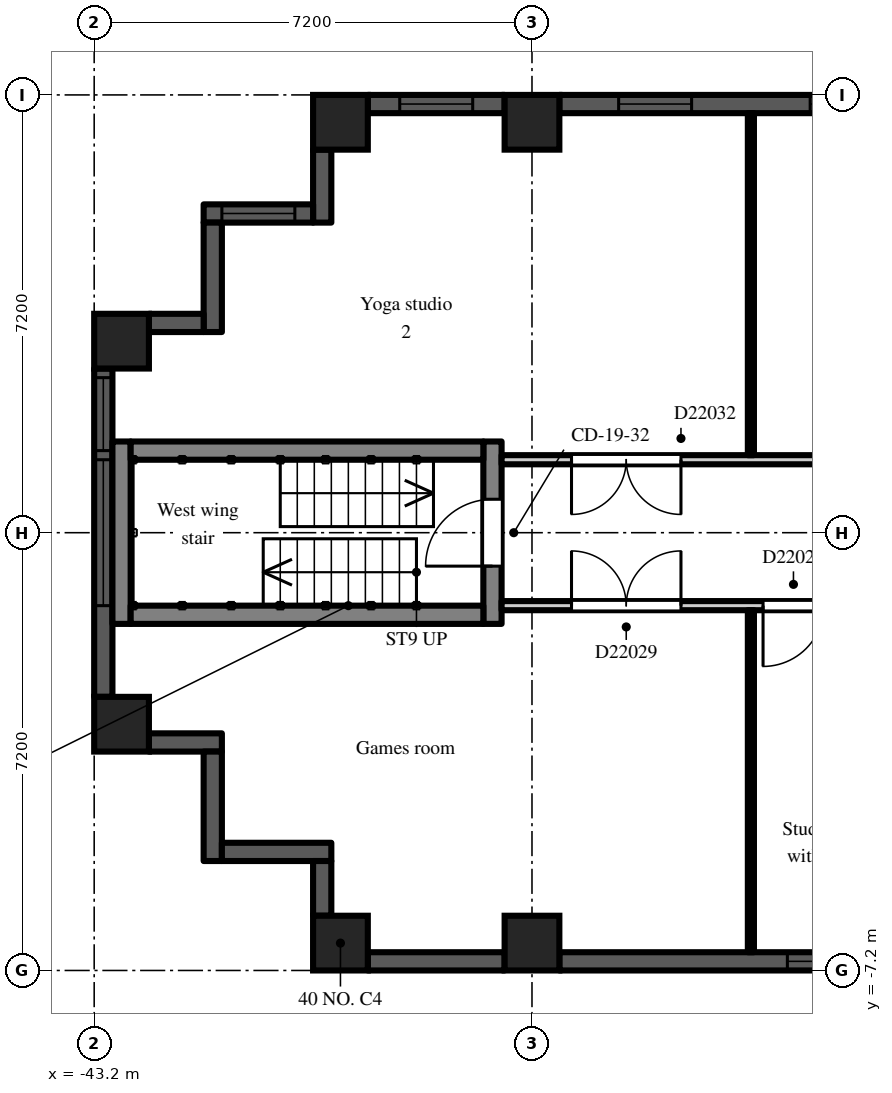
"""IFC4 building model, lengths in metres.
Left out: names, types, materials, properties, quantities, classifications, styles, units other than length and angle.
Written with IfcOpenShell. Run it as: python <this file> out.ifc"""

import sys

from ifc_helpers import new_model, si_unit, direction, frame, frame_2d, origin, origin_2d, place, context, subcontext, project, spatial, rectangle, extrude, element, fill, save


model = new_model("IFC4")
c1 = context("Model", 3, precision=1e-05, world=origin(), true_north=direction((0.0, 1.0)))
c2 = subcontext(c1, "Body", "Model", "MODEL_VIEW")
j1 = project(units=[si_unit("LENGTHUNIT", "METRE"), si_unit("PLANEANGLEUNIT", "RADIAN")], contexts=[c1])
p1 = place(None, origin())
s1 = spatial("IfcSite", under=j1, at=p1, CompositionType="ELEMENT")
p2 = place(p1, origin())
s2 = spatial("IfcBuilding", under=s1, at=p2, CompositionType="ELEMENT")
p3 = place(p2, frame((0.0, 0.0, 159.3)))
s3 = spatial("IfcBuildingStorey", under=s2, at=p3, CompositionType="ELEMENT", Elevation=159.3)
for number, where, z_axis, x_axis in (
    (1, (-42.75, -3.15, 0.0), (0.0, 0.0, 1.0), (1.0, 0.0, 0.0)),
    (2, (-42.75, 3.15, 0.0), (0.0, 0.0, 1.0), (1.0, 0.0, 0.0)),
    (3, (-39.15, -6.75, 0.0), (0.0, 0.0, 1.0), (1.0, 0.0, 0.0)),
    (4, (-39.15, 6.75, 0.0), (0.0, 0.0, 1.0), (1.0, 0.0, 0.0)),
    (5, (-36.0, -6.75, 0.0), (0.0, 0.0, 1.0), (1.0, 0.0, 0.0)),
    (6, (-36.0, 6.75, 0.0), (0.0, 0.0, 1.0), (1.0, 0.0, 0.0)),
):
    element("IfcColumn", number, at=place(p3, frame(where, z_axis=z_axis, x_axis=x_axis)), inside=s3, PredefinedType="COLUMN", context=c2, shape_type="SweptSolid", body=[
        extrude(rectangle(XDim=0.9, YDim=0.9, at=origin_2d()), origin(), (0.0, 0.0, 1.0), 3.0),
    ])
p4 = place(p3, frame((-29.25, 7.05, 0.0), z_axis=(0.0, 0.0, 1.0), x_axis=(-1.0, 0.0, 0.0)))
e7 = element("IfcWall", 7, at=p4, inside=s3, PredefinedType="SOLIDWALL", context=c2, shape_type="SweptSolid", body=[
    extrude(rectangle(XDim=6.3, YDim=0.3, at=frame_2d((3.15, 0.0))), origin(), (0.0, 0.0, 1.0), 2.2),
])
p5 = place(p4, frame((0.975, 0.0, 0.2)))
e8 = element("IfcOpeningElement", 8, at=p5, cuts=e7, PredefinedType="OPENING", context=c2, shape_type="SweptSolid", body=[
    extrude(rectangle(XDim=1.2, YDim=1.85, at=frame_2d((0.6, 0.925))), frame((0.0, 0.16, 0.0), z_axis=(0.0, -1.0, 0.0), x_axis=(1.0, 0.0, 0.0)), (0.0, 0.0, 1.0), 0.32),
])
p6 = place(p4, frame((4.125, 0.0, 0.2)))
e9 = element("IfcOpeningElement", 9, at=p6, cuts=e7, PredefinedType="OPENING", context=c2, shape_type="SweptSolid", body=[
    extrude(rectangle(XDim=1.2, YDim=1.85, at=frame_2d((0.6, 0.925))), frame((0.0, 0.16, 0.0), z_axis=(0.0, -1.0, 0.0), x_axis=(1.0, 0.0, 0.0)), (0.0, 0.0, 1.0), 0.32),
])
p7 = place(p3, frame((-36.45, 7.05, 0.0), z_axis=(0.0, 0.0, 1.0), x_axis=(-1.0, 0.0, 0.0)))
e10 = element("IfcWall", 10, at=p7, inside=s3, PredefinedType="SOLIDWALL", context=c2, shape_type="SweptSolid", body=[
    extrude(rectangle(XDim=2.25, YDim=0.3, at=frame_2d((1.125, 0.0))), origin(), (0.0, 0.0, 1.0), 2.2),
])
p8 = place(p7, frame((0.525, 0.0, 0.2)))
e11 = element("IfcOpeningElement", 11, at=p8, cuts=e10, PredefinedType="OPENING", context=c2, shape_type="SweptSolid", body=[
    extrude(rectangle(XDim=1.2, YDim=1.85, at=frame_2d((0.6, 0.925))), frame((0.0, 0.16, 0.0), z_axis=(0.0, -1.0, 0.0), x_axis=(1.0, 0.0, 0.0)), (0.0, 0.0, 1.0), 0.32),
])
p9 = place(p3, frame((-39.45, 6.3, 0.0), z_axis=(0.0, 0.0, 1.0), x_axis=(0.0, -1.0, 0.0)))
e12 = element("IfcWall", 12, at=p9, inside=s3, PredefinedType="SOLIDWALL", context=c2, shape_type="SweptSolid", body=[
    extrude(rectangle(XDim=1.2, YDim=0.3, at=frame_2d((0.6, 0.0))), origin(), (0.0, 0.0, 1.0), 2.55),
])
p10 = place(p3, frame((-39.6, 5.25, 0.0), z_axis=(0.0, 0.0, 1.0), x_axis=(-1.0, 0.0, 0.0)))
e13 = element("IfcWall", 13, at=p10, inside=s3, PredefinedType="SOLIDWALL", context=c2, shape_type="SweptSolid", body=[
    extrude(rectangle(XDim=1.8, YDim=0.3, at=frame_2d((0.9, 0.0))), origin(), (0.0, 0.0, 1.0), 2.55),
])
p11 = place(p10, frame((0.3, 0.0, 0.2)))
e14 = element("IfcOpeningElement", 14, at=p11, cuts=e13, PredefinedType="OPENING", context=c2, shape_type="SweptSolid", body=[
    extrude(rectangle(XDim=1.2, YDim=1.85, at=frame_2d((0.6, 0.925))), frame((0.0, 0.16, 0.0), z_axis=(0.0, -1.0, 0.0), x_axis=(1.0, 0.0, 0.0)), (0.0, 0.0, 1.0), 0.32),
])
p12 = place(p3, frame((-41.25, 5.1, 0.0), z_axis=(0.0, 0.0, 1.0), x_axis=(0.0, -1.0, 0.0)))
e15 = element("IfcWall", 15, at=p12, inside=s3, PredefinedType="SOLIDWALL", context=c2, shape_type="SweptSolid", body=[
    extrude(rectangle(XDim=1.8, YDim=0.3, at=frame_2d((0.9, 0.0))), origin(), (0.0, 0.0, 1.0), 2.55),
])
p13 = place(p3, frame((-41.4, 3.45, 0.0), z_axis=(0.0, 0.0, 1.0), x_axis=(-1.0, 0.0, 0.0)))
e16 = element("IfcWall", 16, at=p13, inside=s3, PredefinedType="SOLIDWALL", context=c2, shape_type="SweptSolid", body=[
    extrude(rectangle(XDim=0.9, YDim=0.3, at=frame_2d((0.45, 0.0))), origin(), (0.0, 0.0, 1.0), 2.55),
])
p14 = place(p3, frame((-43.05, 2.7, 0.0), z_axis=(0.0, 0.0, 1.0), x_axis=(0.0, -1.0, 0.0)))
e17 = element("IfcWall", 17, at=p14, inside=s3, PredefinedType="SOLIDWALL", context=c2, shape_type="SweptSolid", body=[
    extrude(rectangle(XDim=5.4, YDim=0.3, at=frame_2d((2.7, 0.0))), origin(), (0.0, 0.0, 1.0), 2.2),
])
p15 = place(p14, frame((1.5, 0.0, 0.2)))
e18 = element("IfcOpeningElement", 18, at=p15, cuts=e17, PredefinedType="OPENING", context=c2, shape_type="SweptSolid", body=[
    extrude(rectangle(XDim=2.4, YDim=1.85, at=frame_2d((1.2, 0.925))), frame((0.0, 0.16, 0.0), z_axis=(0.0, -1.0, 0.0), x_axis=(1.0, 0.0, 0.0)), (0.0, 0.0, 1.0), 0.32),
])
p16 = place(p14, frame((0.15, 0.0, 0.2)))
e19 = element("IfcOpeningElement", 19, at=p16, cuts=e17, PredefinedType="OPENING", context=c2, shape_type="SweptSolid", body=[
    extrude(rectangle(XDim=1.2, YDim=1.85, at=frame_2d((0.6, 0.925))), frame((0.0, 0.16, 0.0), z_axis=(0.0, -1.0, 0.0), x_axis=(1.0, 0.0, 0.0)), (0.0, 0.0, 1.0), 0.32),
])
p17 = place(p3, frame((-42.3, -3.45, 0.0), z_axis=(0.0, 0.0, 1.0), x_axis=(1.0, 0.0, 0.0)))
e20 = element("IfcWall", 20, at=p17, inside=s3, PredefinedType="SOLIDWALL", context=c2, shape_type="SweptSolid", body=[
    extrude(rectangle(XDim=1.2, YDim=0.3, at=frame_2d((0.6, 0.0))), origin(), (0.0, 0.0, 1.0), 2.55),
])
p18 = place(p3, frame((-41.25, -3.6, 0.0), z_axis=(0.0, 0.0, 1.0), x_axis=(0.0, -1.0, 0.0)))
e21 = element("IfcWall", 21, at=p18, inside=s3, PredefinedType="SOLIDWALL", context=c2, shape_type="SweptSolid", body=[
    extrude(rectangle(XDim=1.8, YDim=0.3, at=frame_2d((0.9, 0.0))), origin(), (0.0, 0.0, 1.0), 2.55),
])
p19 = place(p3, frame((-41.1, -5.25, 0.0), z_axis=(0.0, 0.0, 1.0), x_axis=(1.0, 0.0, 0.0)))
e22 = element("IfcWall", 22, at=p19, inside=s3, PredefinedType="SOLIDWALL", context=c2, shape_type="SweptSolid", body=[
    extrude(rectangle(XDim=1.8, YDim=0.3, at=frame_2d((0.9, 0.0))), origin(), (0.0, 0.0, 1.0), 2.55),
])
p20 = place(p3, frame((-39.45, -5.4, 0.0), z_axis=(0.0, 0.0, 1.0), x_axis=(0.0, -1.0, 0.0)))
e23 = element("IfcWall", 23, at=p20, inside=s3, PredefinedType="SOLIDWALL", context=c2, shape_type="SweptSolid", body=[
    extrude(rectangle(XDim=0.9, YDim=0.3, at=frame_2d((0.45, 0.0))), origin(), (0.0, 0.0, 1.0), 2.55),
])
p21 = place(p3, frame((-38.7, -7.05, 0.0), z_axis=(0.0, 0.0, 1.0), x_axis=(1.0, 0.0, 0.0)))
e24 = element("IfcWall", 24, at=p21, inside=s3, PredefinedType="SOLIDWALL", context=c2, shape_type="SweptSolid", body=[
    extrude(rectangle(XDim=2.25, YDim=0.3, at=frame_2d((1.125, 0.0))), origin(), (0.0, 0.0, 1.0), 2.2),
])
p22 = place(p3, frame((-35.55, -7.05, 0.0), z_axis=(0.0, 0.0, 1.0), x_axis=(1.0, 0.0, 0.0)))
e25 = element("IfcWall", 25, at=p22, inside=s3, PredefinedType="SOLIDWALL", context=c2, shape_type="SweptSolid", body=[
    extrude(rectangle(XDim=6.3, YDim=0.3, at=frame_2d((3.15, 0.0))), origin(), (0.0, 0.0, 1.0), 2.2),
])
p23 = place(p22, frame((3.75, 0.0, 0.2)))
e26 = element("IfcOpeningElement", 26, at=p23, cuts=e25, PredefinedType="OPENING", context=c2, shape_type="SweptSolid", body=[
    extrude(rectangle(XDim=2.4, YDim=1.85, at=frame_2d((1.2, 0.925))), frame((0.0, 0.16, 0.0), z_axis=(0.0, -1.0, 0.0), x_axis=(1.0, 0.0, 0.0)), (0.0, 0.0, 1.0), 0.32),
])
p24 = place(p3, frame((-36.65, -1.5, 0.0), z_axis=(0.0, 0.0, 1.0), x_axis=(0.0, 1.0, 0.0)))
e27 = element("IfcWall", 27, at=p24, inside=s3, PredefinedType="SHEAR", context=c2, shape_type="SweptSolid", body=[
    extrude(rectangle(XDim=3.0, YDim=0.3, at=frame_2d((1.5, 0.0))), origin(), (0.0, 0.0, 1.0), 2.55),
])
p25 = place(p24, frame((0.95, 0.0, 0.0)))
e28 = element("IfcOpeningElement", 28, at=p25, cuts=e27, PredefinedType="OPENING", context=c2, shape_type="SweptSolid", body=[
    extrude(rectangle(XDim=1.1, YDim=2.1, at=frame_2d((0.55, 1.05))), frame((0.0, 0.16, 0.0), z_axis=(0.0, -1.0, 0.0), x_axis=(1.0, 0.0, 0.0)), (0.0, 0.0, 1.0), 0.32),
])
p26 = place(p3, frame((-42.75, -1.5, 0.0), z_axis=(0.0, 0.0, 1.0), x_axis=(0.0, 1.0, 0.0)))
e29 = element("IfcWall", 29, at=p26, inside=s3, PredefinedType="SHEAR", context=c2, shape_type="SweptSolid", body=[
    extrude(rectangle(XDim=3.0, YDim=0.3, at=frame_2d((1.5, 0.0))), origin(), (0.0, 0.0, 1.0), 2.55),
])
for number, where, z_axis, x_axis in (
    (30, (-36.8, -1.35, 0.0), (0.0, 0.0, 1.0), (-1.0, 0.0, 0.0)),
    (31, (-36.8, 1.35, 0.0), (0.0, 0.0, 1.0), (-1.0, 0.0, 0.0)),
):
    element("IfcWall", number, at=place(p3, frame(where, z_axis=z_axis, x_axis=x_axis)), inside=s3, PredefinedType="SHEAR", context=c2, shape_type="SweptSolid", body=[
        extrude(rectangle(XDim=5.8, YDim=0.3, at=frame_2d((2.9, 0.0))), origin(), (0.0, 0.0, 1.0), 2.55),
    ])
p27 = place(p3, frame((-36.5, -1.2, 0.0), z_axis=(0.0, 0.0, 1.0), x_axis=(1.0, 0.0, 0.0)))
e32 = element("IfcWall", 32, at=p27, inside=s3, PredefinedType="PARTITIONING", context=c2, shape_type="SweptSolid", body=[
    extrude(rectangle(XDim=14.9, YDim=0.15, at=frame_2d((7.45, 0.0))), origin(), (0.0, 0.0, 1.0), 2.55),
])
p28 = place(p27, frame((10.4, 0.0, 0.0)))
e33 = element("IfcOpeningElement", 33, at=p28, cuts=e32, PredefinedType="OPENING", context=c2, shape_type="SweptSolid", body=[
    extrude(rectangle(XDim=1.8, YDim=2.1, at=frame_2d((0.9, 1.05))), frame((0.0, 0.085, 0.0), z_axis=(0.0, -1.0, 0.0), x_axis=(1.0, 0.0, 0.0)), (0.0, 0.0, 1.0), 0.17),
])
p29 = place(p27, frame((4.3, 0.0, 0.0)))
e34 = element("IfcOpeningElement", 34, at=p29, cuts=e32, PredefinedType="OPENING", context=c2, shape_type="SweptSolid", body=[
    extrude(rectangle(XDim=1.0, YDim=2.1, at=frame_2d((0.5, 1.05))), frame((0.0, 0.085, 0.0), z_axis=(0.0, -1.0, 0.0), x_axis=(1.0, 0.0, 0.0)), (0.0, 0.0, 1.0), 0.17),
])
p30 = place(p27, frame((1.15, 0.0, 0.0)))
e35 = element("IfcOpeningElement", 35, at=p30, cuts=e32, PredefinedType="OPENING", context=c2, shape_type="SweptSolid", body=[
    extrude(rectangle(XDim=1.8, YDim=2.1, at=frame_2d((0.9, 1.05))), frame((0.0, 0.085, 0.0), z_axis=(0.0, -1.0, 0.0), x_axis=(1.0, 0.0, 0.0)), (0.0, 0.0, 1.0), 0.17),
])
p31 = place(p3, frame((-36.5, 1.2, 0.0), z_axis=(0.0, 0.0, 1.0), x_axis=(1.0, 0.0, 0.0)))
e36 = element("IfcWall", 36, at=p31, inside=s3, PredefinedType="PARTITIONING", context=c2, shape_type="SweptSolid", body=[
    extrude(rectangle(XDim=14.9, YDim=0.15, at=frame_2d((7.45, 0.0))), origin(), (0.0, 0.0, 1.0), 2.55),
])
p32 = place(p31, frame((10.4, 0.0, 0.0)))
e37 = element("IfcOpeningElement", 37, at=p32, cuts=e36, PredefinedType="OPENING", context=c2, shape_type="SweptSolid", body=[
    extrude(rectangle(XDim=1.8, YDim=2.1, at=frame_2d((0.9, 1.05))), frame((0.0, 0.085, 0.0), z_axis=(0.0, -1.0, 0.0), x_axis=(1.0, 0.0, 0.0)), (0.0, 0.0, 1.0), 0.17),
])
p33 = place(p31, frame((5.45, 0.0, 0.0)))
e38 = element("IfcOpeningElement", 38, at=p33, cuts=e36, PredefinedType="OPENING", context=c2, shape_type="SweptSolid", body=[
    extrude(rectangle(XDim=0.9, YDim=2.1, at=frame_2d((0.45, 1.05))), frame((0.0, 0.085, 0.0), z_axis=(0.0, -1.0, 0.0), x_axis=(1.0, 0.0, 0.0)), (0.0, 0.0, 1.0), 0.17),
])
p34 = place(p31, frame((1.15, 0.0, 0.0)))
e39 = element("IfcOpeningElement", 39, at=p34, cuts=e36, PredefinedType="OPENING", context=c2, shape_type="SweptSolid", body=[
    extrude(rectangle(XDim=1.8, YDim=2.1, at=frame_2d((0.9, 1.05))), frame((0.0, 0.085, 0.0), z_axis=(0.0, -1.0, 0.0), x_axis=(1.0, 0.0, 0.0)), (0.0, 0.0, 1.0), 0.17),
])
for number, where, z_axis, x_axis in (
    (40, (-32.4, -6.9, 0.0), (0.0, 0.0, 1.0), (0.0, 1.0, 0.0)),
    (41, (-32.4, 1.275, 0.0), (0.0, 0.0, 1.0), (0.0, 1.0, 0.0)),
):
    element("IfcWall", number, at=place(p3, frame(where, z_axis=z_axis, x_axis=x_axis)), inside=s3, PredefinedType="PARTITIONING", context=c2, shape_type="SweptSolid", body=[
        extrude(rectangle(XDim=5.625, YDim=0.1, at=frame_2d((2.812, 0.0))), origin(), (0.0, 0.0, 1.0), 2.55),
    ])
p35 = place(p5, origin())
e42 = element("IfcWindow", 42, at=p35, inside=s3, PartitioningType="SINGLE_PANEL", PredefinedType="WINDOW", context=c2, shape_type="SweptSolid", body=[
    extrude(rectangle(XDim=1.2, YDim=1.85, at=frame_2d((0.6, 0.925))), frame((0.0, 0.03, 0.0), z_axis=(0.0, -1.0, 0.0), x_axis=(1.0, 0.0, 0.0)), (0.0, 0.0, 1.0), 0.06),
])
fill(e8, e42)
p36 = place(p6, origin())
e43 = element("IfcWindow", 43, at=p36, inside=s3, PartitioningType="SINGLE_PANEL", PredefinedType="WINDOW", context=c2, shape_type="SweptSolid", body=[
    extrude(rectangle(XDim=1.2, YDim=1.85, at=frame_2d((0.6, 0.925))), frame((0.0, 0.03, 0.0), z_axis=(0.0, -1.0, 0.0), x_axis=(1.0, 0.0, 0.0)), (0.0, 0.0, 1.0), 0.06),
])
fill(e9, e43)
p37 = place(p8, origin())
e44 = element("IfcWindow", 44, at=p37, inside=s3, PartitioningType="SINGLE_PANEL", PredefinedType="WINDOW", context=c2, shape_type="SweptSolid", body=[
    extrude(rectangle(XDim=1.2, YDim=1.85, at=frame_2d((0.6, 0.925))), frame((0.0, 0.03, 0.0), z_axis=(0.0, -1.0, 0.0), x_axis=(1.0, 0.0, 0.0)), (0.0, 0.0, 1.0), 0.06),
])
fill(e11, e44)
p38 = place(p11, origin())
e45 = element("IfcWindow", 45, at=p38, inside=s3, PartitioningType="SINGLE_PANEL", PredefinedType="WINDOW", context=c2, shape_type="SweptSolid", body=[
    extrude(rectangle(XDim=1.2, YDim=1.85, at=frame_2d((0.6, 0.925))), frame((0.0, 0.03, 0.0), z_axis=(0.0, -1.0, 0.0), x_axis=(1.0, 0.0, 0.0)), (0.0, 0.0, 1.0), 0.06),
])
fill(e14, e45)
p39 = place(p15, origin())
e46 = element("IfcWindow", 46, at=p39, inside=s3, PartitioningType="SINGLE_PANEL", PredefinedType="WINDOW", context=c2, shape_type="SweptSolid", body=[
    extrude(rectangle(XDim=2.4, YDim=1.85, at=frame_2d((1.2, 0.925))), frame((0.0, 0.03, 0.0), z_axis=(0.0, -1.0, 0.0), x_axis=(1.0, 0.0, 0.0)), (0.0, 0.0, 1.0), 0.06),
])
fill(e18, e46)
p40 = place(p16, origin())
e47 = element("IfcWindow", 47, at=p40, inside=s3, PartitioningType="SINGLE_PANEL", PredefinedType="WINDOW", context=c2, shape_type="SweptSolid", body=[
    extrude(rectangle(XDim=1.2, YDim=1.85, at=frame_2d((0.6, 0.925))), frame((0.0, 0.03, 0.0), z_axis=(0.0, -1.0, 0.0), x_axis=(1.0, 0.0, 0.0)), (0.0, 0.0, 1.0), 0.06),
])
fill(e19, e47)
p41 = place(p23, origin())
e48 = element("IfcWindow", 48, at=p41, inside=s3, PartitioningType="SINGLE_PANEL", PredefinedType="WINDOW", context=c2, shape_type="SweptSolid", body=[
    extrude(rectangle(XDim=2.4, YDim=1.85, at=frame_2d((1.2, 0.925))), frame((0.0, 0.03, 0.0), z_axis=(0.0, -1.0, 0.0), x_axis=(1.0, 0.0, 0.0)), (0.0, 0.0, 1.0), 0.06),
])
fill(e26, e48)
p42 = place(p25, origin())
e49 = element("IfcDoor", 49, at=p42, inside=s3, OperationType="SINGLE_SWING_LEFT", PredefinedType="DOOR", context=c2, shape_type="SweptSolid", body=[
    extrude(rectangle(XDim=1.1, YDim=2.1, at=frame_2d((0.55, 1.05))), frame((0.0, 0.025, 0.0), z_axis=(0.0, -1.0, 0.0), x_axis=(1.0, 0.0, 0.0)), (0.0, 0.0, 1.0), 0.05),
])
fill(e28, e49)
p43 = place(p29, frame((1.0, 0.0, 0.0), z_axis=(0.0, 0.0, 1.0), x_axis=(-1.0, 0.0, 0.0)))
e50 = element("IfcDoor", 50, at=p43, inside=s3, OperationType="SINGLE_SWING_RIGHT", PredefinedType="DOOR", context=c2, shape_type="SweptSolid", body=[
    extrude(rectangle(XDim=1.0, YDim=2.1, at=frame_2d((0.5, 1.05))), frame((0.0, 0.025, 0.0), z_axis=(0.0, -1.0, 0.0), x_axis=(1.0, 0.0, 0.0)), (0.0, 0.0, 1.0), 0.05),
])
fill(e34, e50)
p44 = place(p30, origin())
e51 = element("IfcDoor", 51, at=p44, inside=s3, OperationType="DOUBLE_DOOR_DOUBLE_SWING", PredefinedType="DOOR", context=c2, shape_type="SweptSolid", body=[
    extrude(rectangle(XDim=1.8, YDim=2.1, at=frame_2d((0.9, 1.05))), frame((0.0, 0.025, 0.0), z_axis=(0.0, -1.0, 0.0), x_axis=(1.0, 0.0, 0.0)), (0.0, 0.0, 1.0), 0.05),
])
fill(e35, e51)
p45 = place(p34, frame((1.8, 0.0, 0.0), z_axis=(0.0, 0.0, 1.0), x_axis=(-1.0, 0.0, 0.0)))
e52 = element("IfcDoor", 52, at=p45, inside=s3, OperationType="DOUBLE_DOOR_DOUBLE_SWING", PredefinedType="DOOR", context=c2, shape_type="SweptSolid", body=[
    extrude(rectangle(XDim=1.8, YDim=2.1, at=frame_2d((0.9, 1.05))), frame((0.0, 0.025, 0.0), z_axis=(0.0, -1.0, 0.0), x_axis=(1.0, 0.0, 0.0)), (0.0, 0.0, 1.0), 0.05),
])
fill(e39, e52)
save(model, sys.argv[1])
